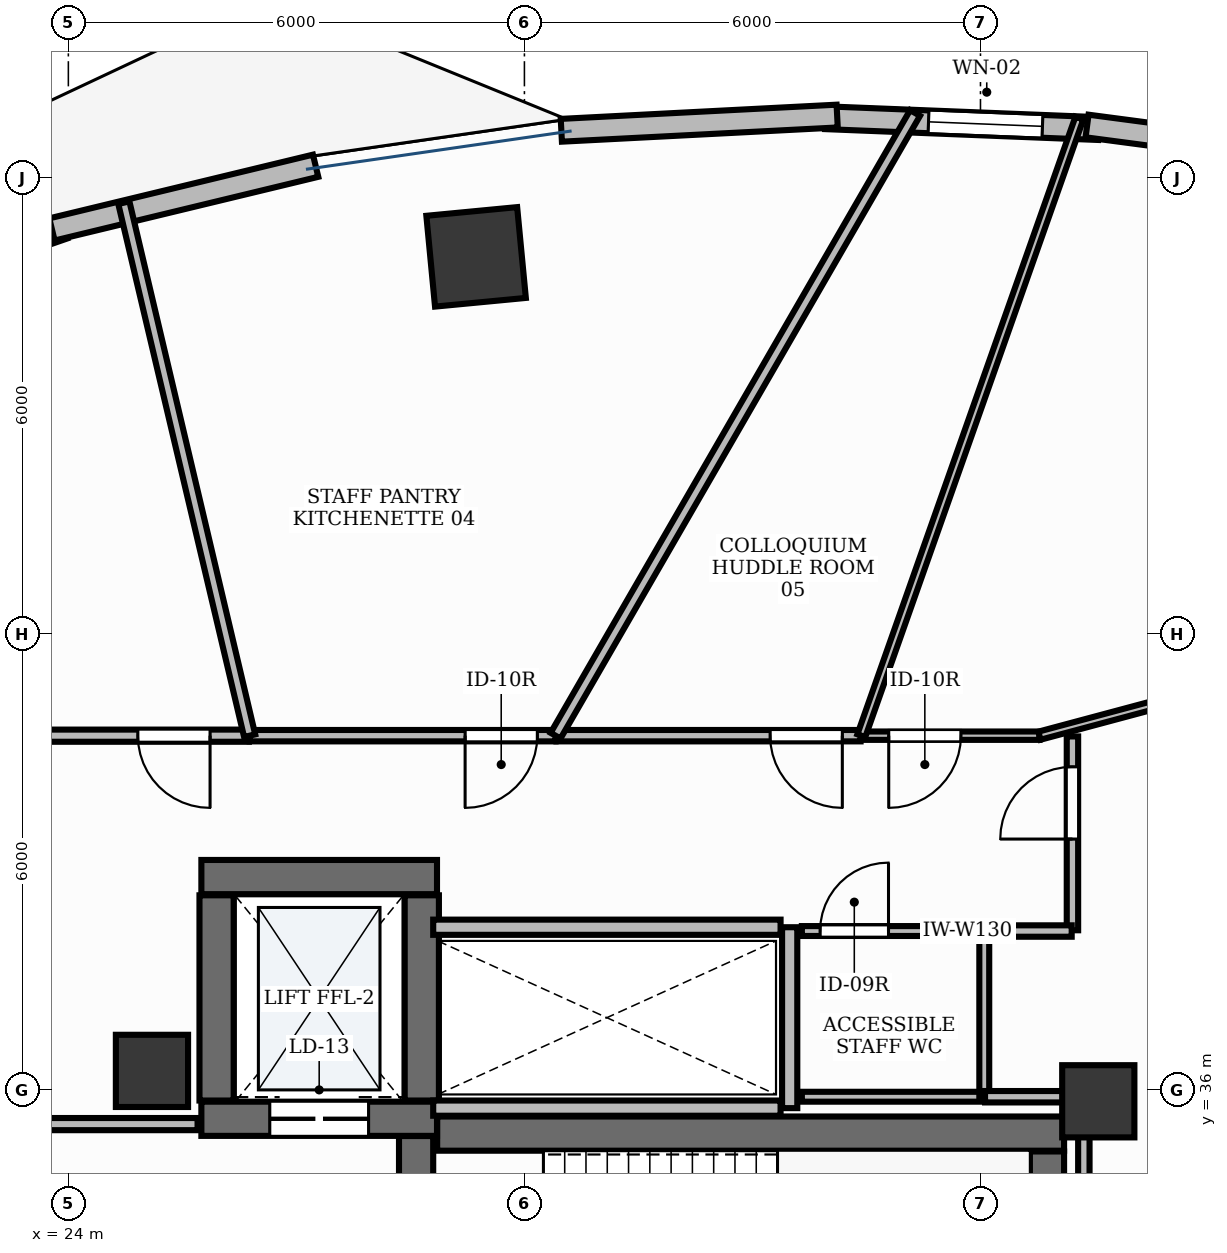
"""IFC4 building model, lengths in metres.
Left out: names, types, materials, properties, quantities, classifications, styles, units other than length and angle.
Written with IfcOpenShell. Run it as: python <this file> out.ifc"""

import sys

from ifc_helpers import new_model, si_unit, direction, frame, frame_2d, origin, origin_2d, place, context, subcontext, project, spatial, rectangle, extrude, element, fill, save


model = new_model("IFC4")
c1 = context("Model", 3, precision=1e-05, world=origin(), true_north=direction((0.0, 1.0)))
c2 = subcontext(c1, "Body", "Model", "MODEL_VIEW")
j1 = project(units=[si_unit("LENGTHUNIT", "METRE"), si_unit("PLANEANGLEUNIT", "RADIAN")], contexts=[c1])
p1 = place(None, origin())
s1 = spatial("IfcSite", under=j1, at=p1, CompositionType="ELEMENT")
p2 = place(p1, origin())
s2 = spatial("IfcBuilding", under=s1, at=p2, CompositionType="ELEMENT")
p3 = place(p2, frame((0.0, 0.0, 136.2)))
s3 = spatial("IfcBuildingStorey", under=s2, at=p3, CompositionType="ELEMENT", Elevation=136.2)
p4 = place(p3, frame((28.852, 35.425, 0.0), z_axis=(0.0, 0.0, 1.0), x_axis=(1.0, 0.0, 0.0)))
e1 = element("IfcWall", 1, at=p4, inside=s3, PredefinedType="SHEAR", context=c2, shape_type="SweptSolid", body=[
    extrude(rectangle(XDim=8.248, YDim=0.45, at=frame_2d((4.124, 0.0))), origin(), (0.0, 0.0, 1.0), 3.9),
])
p5 = place(p3, frame((36.875, 32.11, 0.0), z_axis=(0.0, 0.0, 1.0), x_axis=(0.0, 1.0, 0.0)))
e2 = element("IfcWall", 2, at=p5, inside=s3, PredefinedType="SHEAR", context=c2, shape_type="SweptSolid", body=[
    extrude(rectangle(XDim=3.08, YDim=0.45, at=frame_2d((1.54, 0.0))), origin(), (0.0, 0.0, 1.0), 3.9),
])
p6 = place(p3, frame((28.575, 32.11, 0.0), z_axis=(0.0, 0.0, 1.0), x_axis=(0.0, 1.0, 0.0)))
e3 = element("IfcWall", 3, at=p6, inside=s3, PredefinedType="SHEAR", context=c2, shape_type="SweptSolid", body=[
    extrude(rectangle(XDim=3.283, YDim=0.45, at=frame_2d((1.642, 0.0))), origin(), (0.0, 0.0, 1.0), 3.9),
])
p7 = place(p6, frame((0.2, 0.0, 0.0)))
e4 = element("IfcOpeningElement", 4, at=p7, cuts=e3, PredefinedType="OPENING", context=c2, shape_type="SweptSolid", body=[
    extrude(rectangle(XDim=1.05, YDim=2.15, at=frame_2d((0.525, 1.075))), frame((0.0, 0.24, 0.0), z_axis=(0.0, -1.0, 0.0), x_axis=(1.0, 0.0, 0.0)), (0.0, 0.0, 1.0), 0.48),
])
p8 = place(p3, frame((25.75, 38.8, 0.0), z_axis=(0.0, 0.0, 1.0), x_axis=(1.0, 0.0, 0.0)))
e5 = element("IfcWall", 5, at=p8, inside=s3, PredefinedType="SHEAR", context=c2, shape_type="SweptSolid", body=[
    extrude(rectangle(XDim=3.1, YDim=0.45, at=frame_2d((1.55, 0.0))), origin(), (0.0, 0.0, 1.0), 3.9),
])
p9 = place(p3, frame((25.75, 35.62, 0.0), z_axis=(0.0, 0.0, 1.0), x_axis=(1.0, 0.0, 0.0)))
e6 = element("IfcWall", 6, at=p9, inside=s3, PredefinedType="SHEAR", context=c2, shape_type="SweptSolid", body=[
    extrude(rectangle(XDim=3.1, YDim=0.45, at=frame_2d((1.55, 0.0))), origin(), (0.0, 0.0, 1.0), 3.9),
])
p10 = place(p9, frame((0.9, 0.0, 0.0)))
e7 = element("IfcOpeningElement", 7, at=p10, cuts=e6, PredefinedType="OPENING", context=c2, shape_type="SweptSolid", body=[
    extrude(rectangle(XDim=1.3, YDim=2.2, at=frame_2d((0.65, 1.1))), frame((0.0, 0.24, 0.0), z_axis=(0.0, -1.0, 0.0), x_axis=(1.0, 0.0, 0.0)), (0.0, 0.0, 1.0), 0.48),
])
for number, where, z_axis, x_axis in (
    (8, (25.95, 35.86, 0.0), (0.0, 0.0, 1.0), (0.0, 1.0, 0.0)),
    (9, (28.65, 35.86, 0.0), (0.0, 0.0, 1.0), (0.0, 1.0, 0.0)),
):
    element("IfcWall", number, at=place(p3, frame(where, z_axis=z_axis, x_axis=x_axis)), inside=s3, PredefinedType="SHEAR", context=c2, shape_type="SweptSolid", body=[
        extrude(rectangle(XDim=2.7, YDim=0.45, at=frame_2d((1.35, 0.0))), origin(), (0.0, 0.0, 1.0), 3.9),
    ])
for number, where, z_axis, x_axis in (
    (10, (37.55, 35.85, -0.0), (0.0, 0.0, 1.0), (1.0, 0.0, 0.0)),
    (11, (25.1, 36.25, -0.0), (0.0, 0.0, 1.0), (1.0, 0.0, 0.0)),
):
    element("IfcColumn", number, at=place(p3, frame(where, z_axis=z_axis, x_axis=x_axis)), inside=s3, PredefinedType="PILASTER", context=c2, shape_type="SweptSolid", body=[
        extrude(rectangle(XDim=0.95, YDim=0.95, at=origin_2d()), origin(), (0.0, 0.0, 1.0), 3.901),
    ])
p11 = place(p3, frame((29.364, 46.959, -0.0), z_axis=(0.0, 0.0, 1.0), x_axis=(0.995462868748, 0.095150811579, 0.0)))
e12 = element("IfcColumn", 12, at=p11, inside=s3, PredefinedType="COLUMN", context=c2, shape_type="SweptSolid", body=[
    extrude(rectangle(XDim=1.2, YDim=1.2, at=origin_2d()), origin(), (0.0, 0.0, 1.0), 3.901),
])
p12 = place(p3, frame((37.554, 48.647, 0.0), z_axis=(0.0, 0.0, 1.0), x_axis=(-0.999210691503, 0.039723972445, 0.0)))
e13 = element("IfcWall", 13, at=p12, inside=s3, PredefinedType="STANDARD", context=c2, shape_type="SweptSolid", body=[
    extrude(rectangle(XDim=3.595, YDim=0.3, at=frame_2d((1.798, 0.0))), origin(), (0.0, 0.0, 1.0), 3.9),
])
p13 = place(p12, frame((0.739, 0.0, 0.95)))
e14 = element("IfcOpeningElement", 14, at=p13, cuts=e13, PredefinedType="OPENING", context=c2, shape_type="SweptSolid", body=[
    extrude(rectangle(XDim=1.5, YDim=1.8, at=frame_2d((0.75, 0.9))), frame((0.0, 0.165, 0.0), z_axis=(0.0, -1.0, 0.0), x_axis=(1.0, 0.0, 0.0)), (0.0, 0.0, 1.0), 0.33),
])
p14 = place(p3, frame((23.938, 47.343, 0.0), z_axis=(0.0, 0.0, 1.0), x_axis=(-0.944878029854, -0.3274225232, 0.0)))
e15 = element("IfcWall", 15, at=p14, inside=s3, PredefinedType="STANDARD", context=c2, shape_type="SweptSolid", body=[
    extrude(rectangle(XDim=3.467, YDim=0.3, at=frame_2d((1.734, 0.0))), origin(), (0.0, 0.0, 1.0), 3.9),
])
p15 = place(p14, frame((1.184, 0.0, 0.0)))
e16 = element("IfcOpeningElement", 16, at=p15, cuts=e15, PredefinedType="OPENING", context=c2, shape_type="SweptSolid", body=[
    extrude(rectangle(XDim=1.1, YDim=2.15, at=frame_2d((0.55, 1.075))), frame((0.0, 0.165, 0.0), z_axis=(0.0, -1.0, 0.0), x_axis=(1.0, 0.0, 0.0)), (0.0, 0.0, 1.0), 0.33),
])
p16 = place(p3, frame((40.987, 48.207, 0.0), z_axis=(0.0, 0.0, 1.0), x_axis=(-0.991372969521, 0.131071107816, 0.0)))
e17 = element("IfcWall", 17, at=p16, inside=s3, PredefinedType="STANDARD", context=c2, shape_type="SweptSolid", body=[
    extrude(rectangle(XDim=3.615, YDim=0.3, at=frame_2d((1.808, 0.0))), origin(), (0.0, 0.0, 1.0), 3.9),
])
p17 = place(p3, frame((34.115, 48.812, 0.0), z_axis=(0.0, 0.0, 1.0), x_axis=(-0.998674767218, -0.051465613004, 0.0)))
e18 = element("IfcWall", 18, at=p17, inside=s3, PredefinedType="STANDARD", context=c2, shape_type="SweptSolid", body=[
    extrude(rectangle(XDim=3.634, YDim=0.3, at=frame_2d((1.817, 0.0))), origin(), (0.0, 0.0, 1.0), 3.9),
])
p18 = place(p3, frame((27.253, 48.158, 0.0), z_axis=(0.0, 0.0, 1.0), x_axis=(-0.972043452321, -0.234801036625, 0.0)))
e19 = element("IfcWall", 19, at=p18, inside=s3, PredefinedType="STANDARD", context=c2, shape_type="SweptSolid", body=[
    extrude(rectangle(XDim=3.569, YDim=0.3, at=frame_2d((1.784, 0.0))), origin(), (0.0, 0.0, 1.0), 3.9),
])
p19 = place(p3, frame((33.49, 35.76, 0.0), z_axis=(0.0, 0.0, 1.0), x_axis=(0.0, 1.0, 0.0)))
e20 = element("IfcWall", 20, at=p19, inside=s3, PredefinedType="PARTITIONING", context=c2, shape_type="SweptSolid", body=[
    extrude(rectangle(XDim=2.38, YDim=0.2, at=frame_2d((1.19, 0.0))), origin(), (0.0, 0.0, 1.0), 2.91),
])
for number, where, z_axis, x_axis in (
    (21, (28.8, 35.76, 0.0), (0.0, 0.0, 1.0), (1.0, 0.0, 0.0)),
    (22, (28.8, 38.14, 0.0), (0.0, 0.0, 1.0), (1.0, 0.0, 0.0)),
):
    element("IfcWall", number, at=place(p3, frame(where, z_axis=z_axis, x_axis=x_axis)), inside=s3, PredefinedType="PARTITIONING", context=c2, shape_type="SweptSolid", body=[
        extrude(rectangle(XDim=4.57, YDim=0.2, at=frame_2d((2.285, 0.0))), origin(), (0.0, 0.0, 1.0), 2.91),
    ])
p20 = place(p3, frame((23.58, 35.55, 0.0), z_axis=(0.0, 0.0, 1.0), x_axis=(1.0, 0.0, 0.0)))
e23 = element("IfcWall", 23, at=p20, inside=s3, PredefinedType="PARTITIONING", context=c2, shape_type="SweptSolid", body=[
    extrude(rectangle(XDim=2.12, YDim=0.16, at=frame_2d((1.06, 0.0))), origin(), (0.0, 0.0, 1.0), 2.91),
])
p21 = place(p3, frame((33.65, 38.09, 0.0), z_axis=(0.0, 0.0, 1.0), x_axis=(1.0, 0.0, 0.0)))
e24 = element("IfcWall", 24, at=p21, inside=s3, PredefinedType="PARTITIONING", context=c2, shape_type="SweptSolid", body=[
    extrude(rectangle(XDim=2.4, YDim=0.13, at=frame_2d((1.2, 0.0))), origin(), (0.0, 0.0, 1.0), 2.91),
])
p22 = place(p21, frame((0.24, 0.0, 0.0)))
e25 = element("IfcOpeningElement", 25, at=p22, cuts=e24, PredefinedType="OPENING", context=c2, shape_type="SweptSolid", body=[
    extrude(rectangle(XDim=0.9, YDim=2.15, at=frame_2d((0.45, 1.075))), frame((0.0, 0.08, 0.0), z_axis=(0.0, -1.0, 0.0), x_axis=(1.0, 0.0, 0.0)), (0.0, 0.0, 1.0), 0.16),
])
p23 = place(p3, frame((36.776, 40.66, 0.0), z_axis=(0.0, 0.0, 1.0), x_axis=(-1.0, 0.0, 0.0)))
e26 = element("IfcWall", 26, at=p23, inside=s3, PredefinedType="MOVABLE", context=c2, shape_type="SweptSolid", body=[
    extrude(rectangle(XDim=2.344, YDim=0.11, at=frame_2d((1.172, 0.0))), origin(), (0.0, 0.0, 1.0), 2.91),
])
p24 = place(p23, frame((1.033, 0.0, 0.0)))
e27 = element("IfcOpeningElement", 27, at=p24, cuts=e26, PredefinedType="OPENING", context=c2, shape_type="SweptSolid", body=[
    extrude(rectangle(XDim=0.95, YDim=2.15, at=frame_2d((0.475, 1.075))), frame((0.0, 0.07, 0.0), z_axis=(0.0, -1.0, 0.0), x_axis=(1.0, 0.0, 0.0)), (0.0, 0.0, 1.0), 0.14),
])
p25 = place(p3, frame((37.21, 38.1, 0.0), z_axis=(0.0, 0.0, 1.0), x_axis=(0.0, 1.0, 0.0)))
e28 = element("IfcWall", 28, at=p25, inside=s3, PredefinedType="PARTITIONING", context=c2, shape_type="SweptSolid", body=[
    extrude(rectangle(XDim=2.55, YDim=0.15, at=frame_2d((1.275, 0.0))), origin(), (0.0, 0.0, 1.0), 2.91),
])
p26 = place(p25, frame((1.2, 0.0, 0.0)))
e29 = element("IfcOpeningElement", 29, at=p26, cuts=e28, PredefinedType="OPENING", context=c2, shape_type="SweptSolid", body=[
    extrude(rectangle(XDim=0.95, YDim=2.15, at=frame_2d((0.475, 1.075))), frame((0.0, 0.09, 0.0), z_axis=(0.0, -1.0, 0.0), x_axis=(1.0, 0.0, 0.0)), (0.0, 0.0, 1.0), 0.18),
])
p27 = place(p3, frame((30.41, 40.66, 0.0), z_axis=(0.0, 0.0, 1.0), x_axis=(-1.0, 0.0, 0.0)))
e30 = element("IfcWall", 30, at=p27, inside=s3, PredefinedType="PARTITIONING", context=c2, shape_type="SweptSolid", body=[
    extrude(rectangle(XDim=4.025, YDim=0.15, at=frame_2d((2.012, 0.0))), origin(), (0.0, 0.0, 1.0), 2.91),
])
p28 = place(p27, frame((0.24, 0.0, 0.0)))
e31 = element("IfcOpeningElement", 31, at=p28, cuts=e30, PredefinedType="OPENING", context=c2, shape_type="SweptSolid", body=[
    extrude(rectangle(XDim=0.95, YDim=2.15, at=frame_2d((0.475, 1.075))), frame((0.0, 0.09, 0.0), z_axis=(0.0, -1.0, 0.0), x_axis=(1.0, 0.0, 0.0)), (0.0, 0.0, 1.0), 0.18),
])
p29 = place(p3, frame((34.423, 40.66, 0.0), z_axis=(0.0, 0.0, 1.0), x_axis=(-1.0, 0.0, 0.0)))
e32 = element("IfcWall", 32, at=p29, inside=s3, PredefinedType="PARTITIONING", context=c2, shape_type="SweptSolid", body=[
    extrude(rectangle(XDim=4.001, YDim=0.15, at=frame_2d((2.0, 0.0))), origin(), (0.0, 0.0, 1.0), 2.91),
])
p30 = place(p29, frame((0.24, 0.0, 0.0)))
e33 = element("IfcOpeningElement", 33, at=p30, cuts=e32, PredefinedType="OPENING", context=c2, shape_type="SweptSolid", body=[
    extrude(rectangle(XDim=0.95, YDim=2.15, at=frame_2d((0.475, 1.075))), frame((0.0, 0.09, 0.0), z_axis=(0.0, -1.0, 0.0), x_axis=(1.0, 0.0, 0.0)), (0.0, 0.0, 1.0), 0.18),
])
p31 = place(p3, frame((26.375, 40.66, 0.0), z_axis=(0.0, 0.0, 1.0), x_axis=(-1.0, 0.0, 0.0)))
e34 = element("IfcWall", 34, at=p31, inside=s3, PredefinedType="PARTITIONING", context=c2, shape_type="SweptSolid", body=[
    extrude(rectangle(XDim=4.625, YDim=0.16, at=frame_2d((2.312, 0.0))), origin(), (0.0, 0.0, 1.0), 2.91),
])
p32 = place(p31, frame((0.51, 0.0, 0.0)))
e35 = element("IfcOpeningElement", 35, at=p32, cuts=e34, PredefinedType="OPENING", context=c2, shape_type="SweptSolid", body=[
    extrude(rectangle(XDim=0.95, YDim=2.15, at=frame_2d((0.475, 1.075))), frame((0.0, 0.095, 0.0), z_axis=(0.0, -1.0, 0.0), x_axis=(1.0, 0.0, 0.0)), (0.0, 0.0, 1.0), 0.19),
])
p33 = place(p3, frame((36.05, 35.91, 0.0), z_axis=(0.0, 0.0, 1.0), x_axis=(-1.0, 0.0, 0.0)))
e36 = element("IfcWall", 36, at=p33, inside=s3, PredefinedType="PARTITIONING", context=c2, shape_type="SweptSolid", body=[
    extrude(rectangle(XDim=2.4, YDim=0.13, at=frame_2d((1.2, 0.0))), origin(), (0.0, 0.0, 1.0), 2.91),
])
p34 = place(p3, frame((36.05, 38.09, 0.0), z_axis=(0.0, 0.0, 1.0), x_axis=(0.0, -1.0, 0.0)))
e37 = element("IfcWall", 37, at=p34, inside=s3, PredefinedType="PARTITIONING", context=c2, shape_type="SweptSolid", body=[
    extrude(rectangle(XDim=2.18, YDim=0.13, at=frame_2d((1.09, 0.0))), origin(), (0.0, 0.0, 1.0), 2.91),
])
p35 = place(p3, frame((51.162, 44.515, 0.0), z_axis=(0.0, 0.0, 1.0), x_axis=(-0.965923245436, -0.258828676785, 0.0)))
e38 = element("IfcWall", 38, at=p35, inside=s3, PredefinedType="MOVABLE", context=c2, shape_type="SweptSolid", body=[
    extrude(rectangle(XDim=14.893, YDim=0.11, at=frame_2d((7.447, 0.0))), origin(), (0.0, 0.0, 1.0), 2.91),
])
p36 = place(p3, frame((34.433, 40.66, 0.0), z_axis=(0.0, 0.0, 1.0), x_axis=(0.332889773539, 0.942965746288, 0.0)))
e39 = element("IfcWall", 39, at=p36, inside=s3, PredefinedType="MOVABLE", context=c2, shape_type="SweptSolid", body=[
    extrude(rectangle(XDim=8.617, YDim=0.11, at=frame_2d((4.308, 0.0))), origin(), (0.0, 0.0, 1.0), 2.91),
])
p37 = place(p3, frame((37.36, 34.258, 0.0), z_axis=(0.0, 0.0, 1.0), x_axis=(0.0, 1.0, 0.0)))
e40 = element("IfcWall", 40, at=p37, inside=s3, PredefinedType="PARTITIONING", context=c2, shape_type="SweptSolid", body=[
    extrude(rectangle(XDim=1.642, YDim=0.15, at=frame_2d((0.821, 0.0))), origin(), (0.0, 0.0, 1.0), 2.91),
])
p38 = place(p3, frame((37.35, 35.91, 0.0), z_axis=(0.0, 0.0, 1.0), x_axis=(-1.0, 0.0, 0.0)))
e41 = element("IfcWall", 41, at=p38, inside=s3, PredefinedType="PARTITIONING", context=c2, shape_type="SweptSolid", body=[
    extrude(rectangle(XDim=1.29, YDim=0.15, at=frame_2d((0.645, 0.0))), origin(), (0.0, 0.0, 1.0), 2.91),
])
p39 = place(p3, frame((36.06, 38.09, 0.0), z_axis=(0.0, 0.0, 1.0), x_axis=(1.0, 0.0, 0.0)))
e42 = element("IfcWall", 42, at=p39, inside=s3, PredefinedType="PARTITIONING", context=c2, shape_type="SweptSolid", body=[
    extrude(rectangle(XDim=1.14, YDim=0.15, at=frame_2d((0.57, 0.0))), origin(), (0.0, 0.0, 1.0), 2.91),
])
p40 = place(p3, frame((35.139, 48.852, 0.0), z_axis=(0.0, 0.0, 1.0), x_axis=(-0.499980869596, -0.866036448446, 0.0)))
e43 = element("IfcWall", 43, at=p40, inside=s3, PredefinedType="PARTITIONING", context=c2, shape_type="SweptSolid", body=[
    extrude(rectangle(XDim=9.459, YDim=0.15, at=frame_2d((4.729, 0.0))), origin(), (0.0, 0.0, 1.0), 2.91),
])
p41 = place(p3, frame((26.385, 40.66, 0.0), z_axis=(0.0, 0.0, 1.0), x_axis=(-0.229741864883, 0.97325159929, 0.0)))
e44 = element("IfcWall", 44, at=p41, inside=s3, PredefinedType="PARTITIONING", context=c2, shape_type="SweptSolid", body=[
    extrude(rectangle(XDim=7.205, YDim=0.15, at=frame_2d((3.603, 0.0))), origin(), (0.0, 0.0, 1.0), 2.91),
])
p42 = place(p13, origin())
e45 = element("IfcWindow", 45, at=p42, inside=s3, PartitioningType="DOUBLE_PANEL_VERTICAL", PredefinedType="WINDOW", context=c2, shape_type="SweptSolid", body=[
    extrude(rectangle(XDim=1.5, YDim=1.8, at=frame_2d((0.75, 0.9))), frame((0.0, 0.03, 0.0), z_axis=(0.0, -1.0, 0.0), x_axis=(1.0, 0.0, 0.0)), (0.0, 0.0, 1.0), 0.06),
])
fill(e14, e45)
p43 = place(p10, origin())
e46 = element("IfcDoor", 46, at=p43, inside=s3, OperationType="DOUBLE_DOOR_SLIDING", PredefinedType="DOOR", context=c2, shape_type="SweptSolid", body=[
    extrude(rectangle(XDim=1.3, YDim=2.2, at=frame_2d((0.65, 1.1))), frame((0.0, 0.025, 0.0), z_axis=(0.0, -1.0, 0.0), x_axis=(1.0, 0.0, 0.0)), (0.0, 0.0, 1.0), 0.05),
])
fill(e7, e46)
p44 = place(p22, origin())
e47 = element("IfcDoor", 47, at=p44, inside=s3, OperationType="SINGLE_SWING_RIGHT", PredefinedType="DOOR", context=c2, shape_type="SweptSolid", body=[
    extrude(rectangle(XDim=0.9, YDim=2.15, at=frame_2d((0.45, 1.075))), frame((0.0, 0.025, 0.0), z_axis=(0.0, -1.0, 0.0), x_axis=(1.0, 0.0, 0.0)), (0.0, 0.0, 1.0), 0.05),
])
fill(e25, e47)
p45 = place(p24, origin())
e48 = element("IfcDoor", 48, at=p45, inside=s3, OperationType="SINGLE_SWING_RIGHT", PredefinedType="DOOR", context=c2, shape_type="SweptSolid", body=[
    extrude(rectangle(XDim=0.95, YDim=2.15, at=frame_2d((0.475, 1.075))), frame((0.0, 0.025, 0.0), z_axis=(0.0, -1.0, 0.0), x_axis=(1.0, 0.0, 0.0)), (0.0, 0.0, 1.0), 0.05),
])
fill(e27, e48)
p46 = place(p26, origin())
e49 = element("IfcDoor", 49, at=p46, inside=s3, OperationType="SINGLE_SWING_LEFT", PredefinedType="DOOR", context=c2, shape_type="SweptSolid", body=[
    extrude(rectangle(XDim=0.95, YDim=2.15, at=frame_2d((0.475, 1.075))), frame((0.0, 0.025, 0.0), z_axis=(0.0, -1.0, 0.0), x_axis=(1.0, 0.0, 0.0)), (0.0, 0.0, 1.0), 0.05),
])
fill(e29, e49)
p47 = place(p28, origin())
e50 = element("IfcDoor", 50, at=p47, inside=s3, OperationType="SINGLE_SWING_RIGHT", PredefinedType="DOOR", context=c2, shape_type="SweptSolid", body=[
    extrude(rectangle(XDim=0.95, YDim=2.15, at=frame_2d((0.475, 1.075))), frame((0.0, 0.025, 0.0), z_axis=(0.0, -1.0, 0.0), x_axis=(1.0, 0.0, 0.0)), (0.0, 0.0, 1.0), 0.05),
])
fill(e31, e50)
p48 = place(p30, origin())
e51 = element("IfcDoor", 51, at=p48, inside=s3, OperationType="SINGLE_SWING_LEFT", PredefinedType="DOOR", context=c2, shape_type="SweptSolid", body=[
    extrude(rectangle(XDim=0.95, YDim=2.15, at=frame_2d((0.475, 1.075))), frame((0.0, 0.025, 0.0), z_axis=(0.0, -1.0, 0.0), x_axis=(1.0, 0.0, 0.0)), (0.0, 0.0, 1.0), 0.05),
])
fill(e33, e51)
p49 = place(p32, origin())
e52 = element("IfcDoor", 52, at=p49, inside=s3, OperationType="SINGLE_SWING_LEFT", PredefinedType="DOOR", context=c2, shape_type="SweptSolid", body=[
    extrude(rectangle(XDim=0.95, YDim=2.15, at=frame_2d((0.475, 1.075))), frame((0.0, 0.025, 0.0), z_axis=(0.0, -1.0, 0.0), x_axis=(1.0, 0.0, 0.0)), (0.0, 0.0, 1.0), 0.05),
])
fill(e35, e52)
save(model, sys.argv[1])
